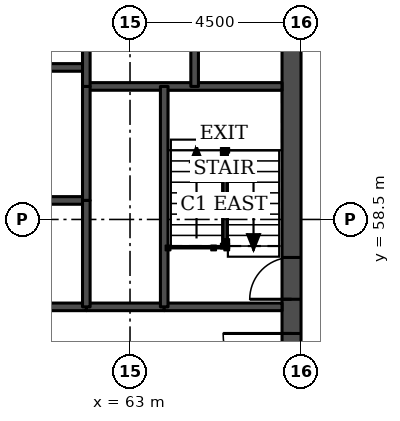
"""IFC4 building model, lengths in metres.
Left out: names, types, materials, properties, quantities, classifications, styles, units other than length and angle.
Written with IfcOpenShell. Run it as: python <this file> out.ifc"""

import sys

from ifc_helpers import new_model, si_unit, direction, frame, frame_2d, origin, place, context, subcontext, project, spatial, rectangle, extrude, element, fill, save


model = new_model("IFC4")
c1 = context("Model", 3, precision=1e-05, world=origin(), true_north=direction((0.0, 1.0)))
c2 = subcontext(c1, "Body", "Model", "MODEL_VIEW")
j1 = project(units=[si_unit("LENGTHUNIT", "METRE"), si_unit("PLANEANGLEUNIT", "RADIAN")], contexts=[c1])
p1 = place(None, origin())
s1 = spatial("IfcSite", under=j1, at=p1, CompositionType="ELEMENT")
p2 = place(p1, origin())
s2 = spatial("IfcBuilding", under=s1, at=p2, CompositionType="ELEMENT")
p3 = place(p2, frame((0.0, 0.0, 26.4)))
s3 = spatial("IfcBuildingStorey", under=s2, at=p3, CompositionType="ELEMENT", Elevation=26.4)
p4 = place(p3, frame((67.25, 49.5, 0.0), z_axis=(0.0, 0.0, 1.0), x_axis=(0.0, 1.0, 0.0)))
e1 = element("IfcWall", 1, at=p4, inside=s3, PredefinedType="SHEAR", context=c2, shape_type="SweptSolid", body=[
    extrude(rectangle(XDim=22.5, YDim=0.5, at=frame_2d((11.25, 0.0))), origin(), (0.0, 0.0, 1.0), 3.3),
])
p5 = place(p4, frame((4.2, 0.0, 0.0)))
e2 = element("IfcOpeningElement", 2, at=p5, cuts=e1, PredefinedType="OPENING", context=c2, shape_type="SweptSolid", body=[
    extrude(rectangle(XDim=1.8, YDim=2.1, at=frame_2d((0.9, 1.05))), frame((0.0, 0.26, 0.0), z_axis=(0.0, -1.0, 0.0), x_axis=(1.0, 0.0, 0.0)), (0.0, 0.0, 1.0), 0.52),
])
p6 = place(p4, frame((6.9, 0.0, 0.0)))
e3 = element("IfcOpeningElement", 3, at=p6, cuts=e1, PredefinedType="OPENING", context=c2, shape_type="SweptSolid", body=[
    extrude(rectangle(XDim=1.1, YDim=2.1, at=frame_2d((0.55, 1.05))), frame((0.0, 0.26, 0.0), z_axis=(0.0, -1.0, 0.0), x_axis=(1.0, 0.0, 0.0)), (0.0, 0.0, 1.0), 0.52),
])
p7 = place(p4, frame((13.6, 0.0, 0.0)))
e4 = element("IfcOpeningElement", 4, at=p7, cuts=e1, PredefinedType="OPENING", context=c2, shape_type="SweptSolid", body=[
    extrude(rectangle(XDim=1.1, YDim=2.1, at=frame_2d((0.55, 1.05))), frame((0.0, 0.26, 0.0), z_axis=(0.0, -1.0, 0.0), x_axis=(1.0, 0.0, 0.0)), (0.0, 0.0, 1.0), 0.52),
])
p8 = place(p4, frame((16.5, 0.0, 0.0)))
e5 = element("IfcOpeningElement", 5, at=p8, cuts=e1, PredefinedType="OPENING", context=c2, shape_type="SweptSolid", body=[
    extrude(rectangle(XDim=1.8, YDim=2.1, at=frame_2d((0.9, 1.05))), frame((0.0, 0.26, 0.0), z_axis=(0.0, -1.0, 0.0), x_axis=(1.0, 0.0, 0.0)), (0.0, 0.0, 1.0), 0.52),
])
p9 = place(p3, frame((61.85, 56.2, 0.0), z_axis=(0.0, 0.0, 1.0), x_axis=(1.0, 0.0, 0.0)))
e6 = element("IfcWall", 6, at=p9, inside=s3, PredefinedType="SOLIDWALL", context=c2, shape_type="SweptSolid", body=[
    extrude(rectangle(XDim=2.05, YDim=0.2, at=frame_2d((1.025, 0.0))), origin(), (0.0, 0.0, 1.0), 3.08),
])
p10 = place(p3, frame((50.65, 56.2, 0.0), z_axis=(0.0, 0.0, 1.0), x_axis=(1.0, 0.0, 0.0)))
e7 = element("IfcWall", 7, at=p10, inside=s3, PredefinedType="SOLIDWALL", context=c2, shape_type="SweptSolid", body=[
    extrude(rectangle(XDim=11.2, YDim=0.2, at=frame_2d((5.6, 0.0))), origin(), (0.0, 0.0, 1.0), 3.08),
])
p11 = place(p3, frame((63.9, 56.2, 0.0), z_axis=(0.0, 0.0, 1.0), x_axis=(1.0, 0.0, 0.0)))
e8 = element("IfcWall", 8, at=p11, inside=s3, PredefinedType="SOLIDWALL", context=c2, shape_type="SweptSolid", body=[
    extrude(rectangle(XDim=3.1, YDim=0.2, at=frame_2d((1.55, 0.0))), origin(), (0.0, 0.0, 1.0), 3.08),
])
p12 = place(p3, frame((50.65, 59.0, 0.0), z_axis=(0.0, 0.0, 1.0), x_axis=(1.0, 0.0, 0.0)))
e9 = element("IfcWall", 9, at=p12, inside=s3, PredefinedType="SOLIDWALL", context=c2, shape_type="SweptSolid", body=[
    extrude(rectangle(XDim=11.2, YDim=0.2, at=frame_2d((5.6, 0.0))), origin(), (0.0, 0.0, 1.0), 3.3),
])
p13 = place(p3, frame((61.85, 62.0, 0.0), z_axis=(0.0, 0.0, 1.0), x_axis=(1.0, 0.0, 0.0)))
e10 = element("IfcWall", 10, at=p13, inside=s3, PredefinedType="SOLIDWALL", context=c2, shape_type="SweptSolid", body=[
    extrude(rectangle(XDim=5.15, YDim=0.2, at=frame_2d((2.575, 0.0))), origin(), (0.0, 0.0, 1.0), 3.08),
])
p14 = place(p3, frame((50.65, 62.5, 0.0), z_axis=(0.0, 0.0, 1.0), x_axis=(1.0, 0.0, 0.0)))
e11 = element("IfcWall", 11, at=p14, inside=s3, PredefinedType="SOLIDWALL", context=c2, shape_type="SweptSolid", body=[
    extrude(rectangle(XDim=11.2, YDim=0.2, at=frame_2d((5.6, 0.0))), origin(), (0.0, 0.0, 1.0), 3.3),
])
p15 = place(p3, frame((61.85, 59.0, 0.0), z_axis=(0.0, 0.0, 1.0), x_axis=(0.0, 1.0, 0.0)))
e12 = element("IfcWall", 12, at=p15, inside=s3, PredefinedType="SOLIDWALL", context=c2, shape_type="SweptSolid", body=[
    extrude(rectangle(XDim=3.0, YDim=0.2, at=frame_2d((1.5, 0.0))), origin(), (0.0, 0.0, 1.0), 3.3),
])
p16 = place(p3, frame((61.85, 56.2, 0.0), z_axis=(0.0, 0.0, 1.0), x_axis=(0.0, 1.0, 0.0)))
e13 = element("IfcWall", 13, at=p16, inside=s3, PredefinedType="SOLIDWALL", context=c2, shape_type="SweptSolid", body=[
    extrude(rectangle(XDim=2.8, YDim=0.2, at=frame_2d((1.4, 0.0))), origin(), (0.0, 0.0, 1.0), 3.08),
])
p17 = place(p3, frame((61.85, 62.0, 0.0), z_axis=(0.0, 0.0, 1.0), x_axis=(0.0, 1.0, 0.0)))
e14 = element("IfcWall", 14, at=p17, inside=s3, PredefinedType="SOLIDWALL", context=c2, shape_type="SweptSolid", body=[
    extrude(rectangle(XDim=3.3, YDim=0.2, at=frame_2d((1.65, 0.0))), origin(), (0.0, 0.0, 1.0), 3.08),
])
p18 = place(p3, frame((63.9, 56.2, 0.0), z_axis=(0.0, 0.0, 1.0), x_axis=(0.0, 1.0, 0.0)))
e15 = element("IfcWall", 15, at=p18, inside=s3, PredefinedType="SOLIDWALL", context=c2, shape_type="SweptSolid", body=[
    extrude(rectangle(XDim=5.8, YDim=0.2, at=frame_2d((2.9, 0.0))), origin(), (0.0, 0.0, 1.0), 3.08),
])
p19 = place(p3, frame((64.7, 62.0, 0.0), z_axis=(0.0, 0.0, 1.0), x_axis=(0.0, 1.0, 0.0)))
e16 = element("IfcWall", 16, at=p19, inside=s3, PredefinedType="SOLIDWALL", context=c2, shape_type="SweptSolid", body=[
    extrude(rectangle(XDim=3.3, YDim=0.2, at=frame_2d((1.65, 0.0))), origin(), (0.0, 0.0, 1.0), 3.08),
])
p20 = place(p19, frame((1.1, 0.0, 0.0)))
e17 = element("IfcOpeningElement", 17, at=p20, cuts=e16, PredefinedType="OPENING", context=c2, shape_type="SweptSolid", body=[
    extrude(rectangle(XDim=1.1, YDim=2.1, at=frame_2d((0.55, 1.05))), frame((0.0, 0.11, 0.0), z_axis=(0.0, -1.0, 0.0), x_axis=(1.0, 0.0, 0.0)), (0.0, 0.0, 1.0), 0.22),
])
p21 = place(p5, origin())
e18 = element("IfcDoor", 18, at=p21, inside=s3, OperationType="SINGLE_SWING_RIGHT", PredefinedType="DOOR", context=c2, shape_type="SweptSolid", body=[
    extrude(rectangle(XDim=1.8, YDim=2.1, at=frame_2d((0.9, 1.05))), frame((0.0, 0.025, 0.0), z_axis=(0.0, -1.0, 0.0), x_axis=(1.0, 0.0, 0.0)), (0.0, 0.0, 1.0), 0.05),
])
fill(e2, e18)
p22 = place(p6, origin())
e19 = element("IfcDoor", 19, at=p22, inside=s3, OperationType="SINGLE_SWING_LEFT", PredefinedType="DOOR", context=c2, shape_type="SweptSolid", body=[
    extrude(rectangle(XDim=1.1, YDim=2.1, at=frame_2d((0.55, 1.05))), frame((0.0, 0.025, 0.0), z_axis=(0.0, -1.0, 0.0), x_axis=(1.0, 0.0, 0.0)), (0.0, 0.0, 1.0), 0.05),
])
fill(e3, e19)
save(model, sys.argv[1])
